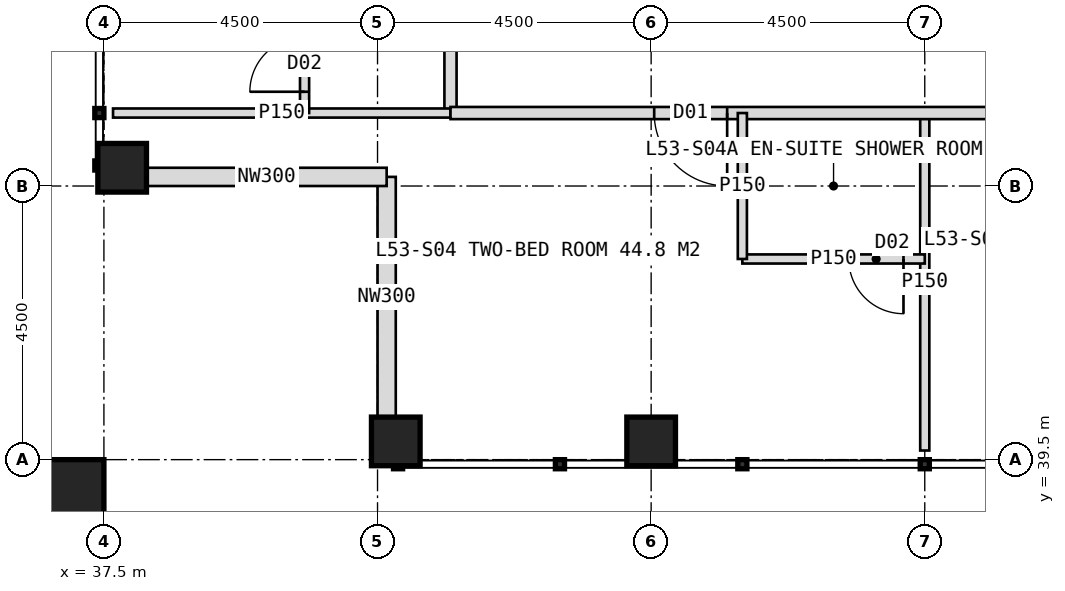
"""IFC4 building model, lengths in metres.
Left out: names, types, materials, properties, quantities, classifications, styles, units other than length and angle.
Written with IfcOpenShell. Run it as: python <this file> out.ifc"""

import sys

from ifc_helpers import new_model, si_unit, direction, frame, frame_2d, origin, origin_2d, place, context, subcontext, project, spatial, rectangle, hollow_rectangle, extrude, element, fill, save


model = new_model("IFC4")
c1 = context("Model", 3, precision=1e-05, world=origin(), true_north=direction((0.0, 1.0)))
c2 = subcontext(c1, "Body", "Model", "MODEL_VIEW")
j1 = project(units=[si_unit("LENGTHUNIT", "METRE"), si_unit("PLANEANGLEUNIT", "RADIAN")], contexts=[c1])
p1 = place(None, origin())
s1 = spatial("IfcSite", under=j1, at=p1, CompositionType="ELEMENT")
p2 = place(p1, origin())
s2 = spatial("IfcBuilding", under=s1, at=p2, CompositionType="ELEMENT")
p3 = place(p2, frame((0.0, 0.0, 221.0)))
s3 = spatial("IfcBuildingStorey", under=s2, at=p3, CompositionType="ELEMENT", Elevation=221.0)
for number, where, z_axis, x_axis in (
    (1, (42.3, 39.8, 0.0), (0.0, 0.0, 1.0), (1.0, 0.0, 0.0)),
    (2, (37.8, 44.3, 0.0), (0.0, 0.0, 1.0), (1.0, 0.0, 0.0)),
    (3, (46.5, 39.8, 0.0), (0.0, 0.0, 1.0), (1.0, 0.0, 0.0)),
):
    element("IfcColumn", number, at=place(p3, frame(where, z_axis=z_axis, x_axis=x_axis)), inside=s3, PredefinedType="COLUMN", context=c2, shape_type="SweptSolid", body=[
        extrude(hollow_rectangle(XDim=0.8, YDim=0.8, WallThickness=0.08, at=origin_2d()), origin(), (0.0, 0.0, 1.0), 4.0),
    ])
p4 = place(p3, frame((36.9, 38.9, 0.0), z_axis=(0.0, 0.0, 1.0), x_axis=(1.0, 0.0, 0.0)))
e4 = element("IfcColumn", 4, at=p4, inside=s3, PredefinedType="COLUMN", context=c2, shape_type="SweptSolid", body=[
    extrude(hollow_rectangle(XDim=1.2, YDim=1.2, WallThickness=0.07, at=origin_2d()), origin(), (0.0, 0.0, 1.0), 4.0),
])
for number, where, z_axis, x_axis in (
    (5, (42.15, 40.2, 0.0), (0.0, 0.0, 1.0), (0.0, 1.0, 0.0)),
    (6, (42.15, 44.15, 0.0), (0.0, 0.0, 1.0), (-1.0, 0.0, 0.0)),
):
    element("IfcWall", number, at=place(p3, frame(where, z_axis=z_axis, x_axis=x_axis)), inside=s3, PredefinedType="ELEMENTEDWALL", context=c2, shape_type="SweptSolid", body=[
        extrude(rectangle(XDim=3.95, YDim=0.3, at=frame_2d((1.975, 0.0))), origin(), (0.0, 0.0, 1.0), 2.85),
    ])
p5 = place(p3, frame((43.2, 45.2, 0.0), z_axis=(0.0, 0.0, 1.0), x_axis=(0.0, 1.0, 0.0)))
e7 = element("IfcWall", 7, at=p5, inside=s3, PredefinedType="PARTITIONING", context=c2, shape_type="SweptSolid", body=[
    extrude(rectangle(XDim=33.6, YDim=0.2, at=frame_2d((16.8, 0.0))), origin(), (0.0, 0.0, 1.0), 3.75),
])
p6 = place(p5, frame((3.25, 0.0, 0.0)))
e8 = element("IfcOpeningElement", 8, at=p6, cuts=e7, PredefinedType="OPENING", context=c2, shape_type="SweptSolid", body=[
    extrude(rectangle(XDim=1.2, YDim=2.2, at=frame_2d((0.6, 1.1))), frame((0.0, 0.11, 0.0), z_axis=(0.0, -1.0, 0.0), x_axis=(1.0, 0.0, 0.0)), (0.0, 0.0, 1.0), 0.22),
])
p7 = place(p5, frame((11.05, 0.0, 0.0)))
e9 = element("IfcOpeningElement", 9, at=p7, cuts=e7, PredefinedType="OPENING", context=c2, shape_type="SweptSolid", body=[
    extrude(rectangle(XDim=1.2, YDim=2.2, at=frame_2d((0.6, 1.1))), frame((0.0, 0.11, 0.0), z_axis=(0.0, -1.0, 0.0), x_axis=(1.0, 0.0, 0.0)), (0.0, 0.0, 1.0), 0.22),
])
p8 = place(p5, frame((20.05, 0.0, 0.0)))
e10 = element("IfcOpeningElement", 10, at=p8, cuts=e7, PredefinedType="OPENING", context=c2, shape_type="SweptSolid", body=[
    extrude(rectangle(XDim=1.2, YDim=2.2, at=frame_2d((0.6, 1.1))), frame((0.0, 0.11, 0.0), z_axis=(0.0, -1.0, 0.0), x_axis=(1.0, 0.0, 0.0)), (0.0, 0.0, 1.0), 0.22),
])
p9 = place(p5, frame((26.95, 0.0, 0.0)))
e11 = element("IfcOpeningElement", 11, at=p9, cuts=e7, PredefinedType="OPENING", context=c2, shape_type="SweptSolid", body=[
    extrude(rectangle(XDim=1.2, YDim=2.2, at=frame_2d((0.6, 1.1))), frame((0.0, 0.11, 0.0), z_axis=(0.0, -1.0, 0.0), x_axis=(1.0, 0.0, 0.0)), (0.0, 0.0, 1.0), 0.22),
])
p10 = place(p3, frame((43.2, 45.2, 0.0), z_axis=(0.0, 0.0, 1.0), x_axis=(-1.0, 0.0, 0.0)))
e12 = element("IfcWall", 12, at=p10, inside=s3, PredefinedType="PARTITIONING", context=c2, shape_type="SweptSolid", body=[
    extrude(rectangle(XDim=5.55, YDim=0.15, at=frame_2d((2.775, 0.0))), origin(), (0.0, 0.0, 1.0), 3.75),
])
p11 = place(p3, frame((40.8, 45.2, 0.0), z_axis=(0.0, 0.0, 1.0), x_axis=(0.0, 1.0, 0.0)))
e13 = element("IfcWall", 13, at=p11, inside=s3, PredefinedType="PARTITIONING", context=c2, shape_type="SweptSolid", body=[
    extrude(rectangle(XDim=3.0, YDim=0.15, at=frame_2d((1.5, 0.0))), origin(), (0.0, 0.0, 1.0), 3.75),
])
p12 = place(p11, frame((0.35, 0.0, 0.0)))
e14 = element("IfcOpeningElement", 14, at=p12, cuts=e13, PredefinedType="OPENING", context=c2, shape_type="SweptSolid", body=[
    extrude(rectangle(XDim=0.9, YDim=2.1, at=frame_2d((0.45, 1.05))), frame((0.0, 0.085, 0.0), z_axis=(0.0, -1.0, 0.0), x_axis=(1.0, 0.0, 0.0)), (0.0, 0.0, 1.0), 0.17),
])
p13 = place(p3, frame((51.0, 45.2, 0.0), z_axis=(0.0, 0.0, 1.0), x_axis=(0.0, -1.0, 0.0)))
e15 = element("IfcWall", 15, at=p13, inside=s3, PredefinedType="PARTITIONING", context=c2, shape_type="SweptSolid", body=[
    extrude(rectangle(XDim=5.55, YDim=0.15, at=frame_2d((2.775, 0.0))), origin(), (0.0, 0.0, 1.0), 3.75),
])
p14 = place(p3, frame((76.8, 45.2, 0.0), z_axis=(0.0, 0.0, 1.0), x_axis=(-1.0, 0.0, 0.0)))
e16 = element("IfcWall", 16, at=p14, inside=s3, PredefinedType="PARTITIONING", context=c2, shape_type="SweptSolid", body=[
    extrude(rectangle(XDim=33.6, YDim=0.2, at=frame_2d((16.8, 0.0))), origin(), (0.0, 0.0, 1.0), 3.75),
])
p15 = place(p14, frame((3.25, 0.0, 0.0)))
e17 = element("IfcOpeningElement", 17, at=p15, cuts=e16, PredefinedType="OPENING", context=c2, shape_type="SweptSolid", body=[
    extrude(rectangle(XDim=1.2, YDim=2.2, at=frame_2d((0.6, 1.1))), frame((0.0, 0.11, 0.0), z_axis=(0.0, -1.0, 0.0), x_axis=(1.0, 0.0, 0.0)), (0.0, 0.0, 1.0), 0.22),
])
p16 = place(p14, frame((11.05, 0.0, 0.0)))
e18 = element("IfcOpeningElement", 18, at=p16, cuts=e16, PredefinedType="OPENING", context=c2, shape_type="SweptSolid", body=[
    extrude(rectangle(XDim=1.2, YDim=2.2, at=frame_2d((0.6, 1.1))), frame((0.0, 0.11, 0.0), z_axis=(0.0, -1.0, 0.0), x_axis=(1.0, 0.0, 0.0)), (0.0, 0.0, 1.0), 0.22),
])
p17 = place(p14, frame((20.05, 0.0, 0.0)))
e19 = element("IfcOpeningElement", 19, at=p17, cuts=e16, PredefinedType="OPENING", context=c2, shape_type="SweptSolid", body=[
    extrude(rectangle(XDim=1.2, YDim=2.2, at=frame_2d((0.6, 1.1))), frame((0.0, 0.11, 0.0), z_axis=(0.0, -1.0, 0.0), x_axis=(1.0, 0.0, 0.0)), (0.0, 0.0, 1.0), 0.22),
])
p18 = place(p14, frame((29.05, 0.0, 0.0)))
e20 = element("IfcOpeningElement", 20, at=p18, cuts=e16, PredefinedType="OPENING", context=c2, shape_type="SweptSolid", body=[
    extrude(rectangle(XDim=1.2, YDim=2.2, at=frame_2d((0.6, 1.1))), frame((0.0, 0.11, 0.0), z_axis=(0.0, -1.0, 0.0), x_axis=(1.0, 0.0, 0.0)), (0.0, 0.0, 1.0), 0.22),
])
p19 = place(p3, frame((51.0, 42.8, 0.0), z_axis=(0.0, 0.0, 1.0), x_axis=(-1.0, 0.0, 0.0)))
e21 = element("IfcWall", 21, at=p19, inside=s3, PredefinedType="PARTITIONING", context=c2, shape_type="SweptSolid", body=[
    extrude(rectangle(XDim=3.0, YDim=0.15, at=frame_2d((1.5, 0.0))), origin(), (0.0, 0.0, 1.0), 3.75),
])
p20 = place(p19, frame((0.35, 0.0, 0.0)))
e22 = element("IfcOpeningElement", 22, at=p20, cuts=e21, PredefinedType="OPENING", context=c2, shape_type="SweptSolid", body=[
    extrude(rectangle(XDim=0.9, YDim=2.1, at=frame_2d((0.45, 1.05))), frame((0.0, 0.085, 0.0), z_axis=(0.0, -1.0, 0.0), x_axis=(1.0, 0.0, 0.0)), (0.0, 0.0, 1.0), 0.17),
])
p21 = place(p3, frame((48.0, 45.2, 0.0), z_axis=(0.0, 0.0, 1.0), x_axis=(0.0, -1.0, 0.0)))
e23 = element("IfcWall", 23, at=p21, inside=s3, PredefinedType="PARTITIONING", context=c2, shape_type="SweptSolid", body=[
    extrude(rectangle(XDim=2.4, YDim=0.15, at=frame_2d((1.2, 0.0))), origin(), (0.0, 0.0, 1.0), 3.75),
])
p22 = place(p12, origin())
e24 = element("IfcDoor", 24, at=p22, inside=s3, OperationType="SINGLE_SWING_LEFT", PredefinedType="DOOR", context=c2, shape_type="SweptSolid", body=[
    extrude(rectangle(XDim=0.9, YDim=2.1, at=frame_2d((0.45, 1.05))), frame((0.0, 0.025, 0.0), z_axis=(0.0, -1.0, 0.0), x_axis=(1.0, 0.0, 0.0)), (0.0, 0.0, 1.0), 0.05),
])
fill(e14, e24)
p23 = place(p18, origin())
e25 = element("IfcDoor", 25, at=p23, inside=s3, OperationType="SINGLE_SWING_LEFT", PredefinedType="DOOR", context=c2, shape_type="SweptSolid", body=[
    extrude(rectangle(XDim=1.2, YDim=2.2, at=frame_2d((0.6, 1.1))), frame((0.0, 0.025, 0.0), z_axis=(0.0, -1.0, 0.0), x_axis=(1.0, 0.0, 0.0)), (0.0, 0.0, 1.0), 0.05),
])
fill(e20, e25)
p24 = place(p20, origin())
e26 = element("IfcDoor", 26, at=p24, inside=s3, OperationType="SINGLE_SWING_LEFT", PredefinedType="DOOR", context=c2, shape_type="SweptSolid", body=[
    extrude(rectangle(XDim=0.9, YDim=2.1, at=frame_2d((0.45, 1.05))), frame((0.0, 0.025, 0.0), z_axis=(0.0, -1.0, 0.0), x_axis=(1.0, 0.0, 0.0)), (0.0, 0.0, 1.0), 0.05),
])
fill(e22, e26)
save(model, sys.argv[1])
